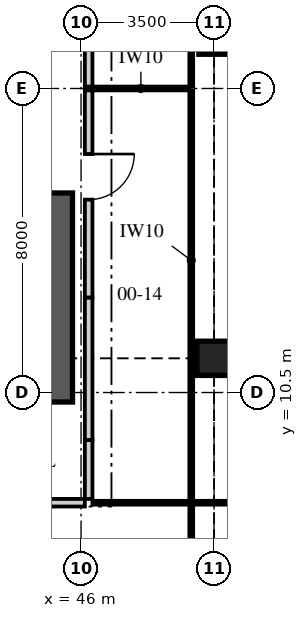
"""IFC4 building model, lengths in metres.
Left out: names, types, materials, properties, quantities, classifications, styles, units other than length and angle.
Written with IfcOpenShell. Run it as: python <this file> out.ifc"""

import sys

from ifc_helpers import new_model, si_unit, direction, frame, frame_2d, origin, origin_2d, place, context, subcontext, project, spatial, polyline, rectangle, outline, extrude, element, fill, save


model = new_model("IFC4")
c1 = context("Model", 3, precision=1e-05, world=origin(), true_north=direction((0.0, 1.0)))
c2 = subcontext(c1, "Body", "Model", "MODEL_VIEW")
j1 = project(units=[si_unit("LENGTHUNIT", "METRE"), si_unit("PLANEANGLEUNIT", "RADIAN")], contexts=[c1])
p1 = place(None, origin())
s1 = spatial("IfcSite", under=j1, at=p1, CompositionType="ELEMENT")
p2 = place(p1, origin())
s2 = spatial("IfcBuilding", under=s1, at=p2, CompositionType="ELEMENT")
p3 = place(p2, origin())
s3 = spatial("IfcBuildingStorey", under=s2, at=p3, CompositionType="ELEMENT", Elevation=0.0)
p4 = place(p3, frame((49.5, 11.4, 0.0), z_axis=(0.0, 0.0, 1.0), x_axis=(1.0, 0.0, 0.0)))
e1 = element("IfcColumn", 1, at=p4, inside=s3, PredefinedType="COLUMN", context=c2, shape_type="SweptSolid", body=[
    extrude(rectangle(XDim=0.9, YDim=0.9, at=origin_2d()), origin(), (0.0, 0.0, 1.0), 6.0),
])
p5 = place(p3, frame((49.5, 19.8, 0.0), z_axis=(0.0, 0.0, 1.0), x_axis=(1.0, 0.0, 0.0)))
e2 = element("IfcColumn", 2, at=p5, inside=s3, PredefinedType="COLUMN", context=c2, shape_type="SweptSolid", body=[
    extrude(rectangle(XDim=0.8, YDim=0.8, at=origin_2d()), origin(), (0.0, 0.0, 1.0), 6.0),
])
p6 = place(p3, frame((48.95, 7.6, 0.0), z_axis=(0.0, 0.0, 1.0), x_axis=(1.0, 0.0, 0.0)))
e3 = element("IfcWall", 3, at=p6, inside=s3, PredefinedType="PARTITIONING", context=c2, shape_type="SweptSolid", body=[
    extrude(outline(polyline([(0.0, 0.0), (1.55, 0.0), (1.55, 5.72), (1.55, 5.12), (0.0, 5.12), (0.0, 5.72), (0.0, 0.0)])), frame((0.0, 0.05, 0.0), z_axis=(0.0, -1.0, 0.0), x_axis=(1.0, 0.0, 0.0)), (0.0, 0.0, 1.0), 0.1),
])
p7 = place(p3, frame((48.9, -6.0, 0.0), z_axis=(0.0, 0.0, 1.0), x_axis=(0.0, 1.0, 0.0)))
e4 = element("IfcWall", 4, at=p7, inside=s3, PredefinedType="PARTITIONING", context=c2, shape_type="SweptSolid", body=[
    extrude(outline(polyline([(0.0, 0.0), (13.55, 0.0), (13.55, 5.72), (13.55, 5.12), (10.26, 5.12), (9.06, 5.12), (2.06, 5.12), (0.0, 5.12), (0.0, 5.72), (0.0, 0.0)])), frame((0.0, 0.05, 0.0), z_axis=(0.0, -1.0, 0.0), x_axis=(1.0, 0.0, 0.0)), (0.0, 0.0, 1.0), 0.1),
])
p8 = place(p3, frame((46.2, 7.7, 0.0), z_axis=(0.0, 0.0, 1.0), x_axis=(0.0, 1.0, 0.0)))
e5 = element("IfcWall", 5, at=p8, inside=s3, PredefinedType="PARTITIONING", context=c2, shape_type="SweptSolid", body=[
    extrude(rectangle(XDim=1.55, YDim=0.2, at=frame_2d((0.775, 0.0))), origin(), (0.0, 0.0, 1.0), 5.72),
])
p9 = place(p3, frame((40.2, 7.6, 0.0), z_axis=(0.0, 0.0, 1.0), x_axis=(1.0, 0.0, 0.0)))
e6 = element("IfcWall", 6, at=p9, inside=s3, PredefinedType="PARTITIONING", context=c2, shape_type="SweptSolid", body=[
    extrude(outline(polyline([(0.0, 0.0), (5.9, 0.0), (5.9, 5.72), (4.479, 5.72), (4.479, 4.92), (1.859, 4.92), (1.859, 5.72), (0.0, 5.72), (0.0, 0.0)])), frame((0.0, 0.1, 0.0), z_axis=(0.0, -1.0, 0.0), x_axis=(1.0, 0.0, 0.0)), (0.0, 0.0, 1.0), 0.2),
])
p10 = place(p3, frame((46.2, 9.25, 0.0), z_axis=(0.0, 0.0, 1.0), x_axis=(0.0, 1.0, 0.0)))
e7 = element("IfcWall", 7, at=p10, inside=s3, PredefinedType="PARTITIONING", context=c2, shape_type="SweptSolid", body=[
    extrude(outline(polyline([(0.0, 0.0), (3.75, 0.0), (3.75, 5.07), (3.64, 5.07), (3.64, 5.72), (3.46, 5.72), (3.46, 5.12), (0.84, 5.12), (0.84, 5.72), (0.0, 5.72), (0.0, 0.0)])), frame((0.0, 0.1, 0.0), z_axis=(0.0, -1.0, 0.0), x_axis=(1.0, 0.0, 0.0)), (0.0, 0.0, 1.0), 0.2),
])
p11 = place(p3, frame((46.2, 13.0, 0.0), z_axis=(0.0, 0.0, 1.0), x_axis=(0.0, 1.0, 0.0)))
e8 = element("IfcWall", 8, at=p11, inside=s3, PredefinedType="PARTITIONING", context=c2, shape_type="SweptSolid", body=[
    extrude(rectangle(XDim=5.45, YDim=0.2, at=frame_2d((2.725, 0.0))), origin(), (0.0, 0.0, 1.0), 5.07),
])
p12 = place(p11, frame((2.575, 0.0, 0.0)))
e9 = element("IfcOpeningElement", 9, at=p12, cuts=e8, PredefinedType="OPENING", context=c2, shape_type="SweptSolid", body=[
    extrude(rectangle(XDim=1.2, YDim=2.4, at=frame_2d((0.6, 1.2))), frame((0.0, 0.11, 0.0), z_axis=(0.0, -1.0, 0.0), x_axis=(1.0, 0.0, 0.0)), (0.0, 0.0, 1.0), 0.22),
])
p13 = place(p3, frame((46.2, 18.55, 0.0), z_axis=(0.0, 0.0, 1.0), x_axis=(0.0, 1.0, 0.0)))
e10 = element("IfcWall", 10, at=p13, inside=s3, PredefinedType="PARTITIONING", context=c2, shape_type="SweptSolid", body=[
    extrude(rectangle(XDim=6.45, YDim=0.2, at=frame_2d((3.225, 0.0))), origin(), (0.0, 0.0, 1.0), 5.07),
])
p14 = place(p13, frame((2.675, 0.0, 0.0)))
e11 = element("IfcOpeningElement", 11, at=p14, cuts=e10, PredefinedType="OPENING", context=c2, shape_type="SweptSolid", body=[
    extrude(rectangle(XDim=1.2, YDim=2.4, at=frame_2d((0.6, 1.2))), frame((0.0, 0.11, 0.0), z_axis=(0.0, -1.0, 0.0), x_axis=(1.0, 0.0, 0.0)), (0.0, 0.0, 1.0), 0.22),
])
p15 = place(p3, frame((46.3, 18.5, 0.0), z_axis=(0.0, 0.0, 1.0), x_axis=(1.0, 0.0, 0.0)))
e12 = element("IfcWall", 12, at=p15, inside=s3, PredefinedType="PARTITIONING", context=c2, shape_type="SweptSolid", body=[
    extrude(outline(polyline([(0.0, 0.0), (2.55, 0.0), (2.55, 5.72), (2.55, 5.12), (1.94, 5.12), (1.94, 5.72), (0.01, 5.72), (0.01, 5.07), (0.0, 5.07), (0.0, 5.72), (0.0, 0.0)])), frame((0.0, 0.05, 0.0), z_axis=(0.0, -1.0, 0.0), x_axis=(1.0, 0.0, 0.0)), (0.0, 0.0, 1.0), 0.1),
])
p16 = place(p3, frame((48.9, 7.65, 0.0), z_axis=(0.0, 0.0, 1.0), x_axis=(0.0, 1.0, 0.0)))
e13 = element("IfcWall", 13, at=p16, inside=s3, PredefinedType="PARTITIONING", context=c2, shape_type="SweptSolid", body=[
    extrude(outline(polyline([(0.0, 0.0), (10.8, 0.0), (10.8, 5.72), (10.8, 5.12), (5.01, 5.12), (3.81, 5.12), (0.0, 5.12), (0.0, 5.72), (0.0, 0.0)])), frame((0.0, 0.05, 0.0), z_axis=(0.0, -1.0, 0.0), x_axis=(1.0, 0.0, 0.0)), (0.0, 0.0, 1.0), 0.1),
])
p17 = place(p3, frame((46.3, 7.6, 0.0), z_axis=(0.0, 0.0, 1.0), x_axis=(1.0, 0.0, 0.0)))
e14 = element("IfcWall", 14, at=p17, inside=s3, PredefinedType="PARTITIONING", context=c2, shape_type="SweptSolid", body=[
    extrude(outline(polyline([(0.0, 0.0), (2.55, 0.0), (2.55, 5.72), (2.55, 5.12), (1.94, 5.12), (1.94, 5.72), (0.0, 5.72), (0.0, 0.0)])), frame((0.0, 0.05, 0.0), z_axis=(0.0, -1.0, 0.0), x_axis=(1.0, 0.0, 0.0)), (0.0, 0.0, 1.0), 0.1),
])
p18 = place(p3, frame((48.9, 18.55, 0.0), z_axis=(0.0, 0.0, 1.0), x_axis=(0.0, 1.0, 0.0)))
e15 = element("IfcWall", 15, at=p18, inside=s3, PredefinedType="PARTITIONING", context=c2, shape_type="SweptSolid", body=[
    extrude(outline(polyline([(0.0, 0.0), (10.8, 0.0), (10.8, 5.72), (10.8, 5.12), (9.71, 5.12), (2.51, 5.12), (1.31, 5.12), (0.0, 5.12), (0.0, 5.72), (0.0, 0.0)])), frame((0.0, 0.05, 0.0), z_axis=(0.0, -1.0, 0.0), x_axis=(1.0, 0.0, 0.0)), (0.0, 0.0, 1.0), 0.1),
])
p19 = place(p3, frame((45.05, 10.25, 0.0), z_axis=(0.0, 0.0, 1.0), x_axis=(0.0, 1.0, 0.0)))
e16 = element("IfcWall", 16, at=p19, inside=s3, PredefinedType="SHEAR", context=c2, shape_type="SweptSolid", body=[
    extrude(rectangle(XDim=5.5, YDim=1.45, at=frame_2d((2.75, 0.0))), origin(), (0.0, 0.0, 1.0), 6.0),
])
p20 = place(p12, frame((1.2, 0.0, 0.0), z_axis=(0.0, 0.0, 1.0), x_axis=(-1.0, 0.0, 0.0)))
e17 = element("IfcDoor", 17, at=p20, inside=s3, OperationType="SINGLE_SWING_LEFT", PredefinedType="DOOR", context=c2, shape_type="SweptSolid", body=[
    extrude(rectangle(XDim=1.2, YDim=2.4, at=frame_2d((0.6, 1.2))), frame((0.0, 0.025, 0.0), z_axis=(0.0, -1.0, 0.0), x_axis=(1.0, 0.0, 0.0)), (0.0, 0.0, 1.0), 0.05),
])
fill(e9, e17)
save(model, sys.argv[1])
